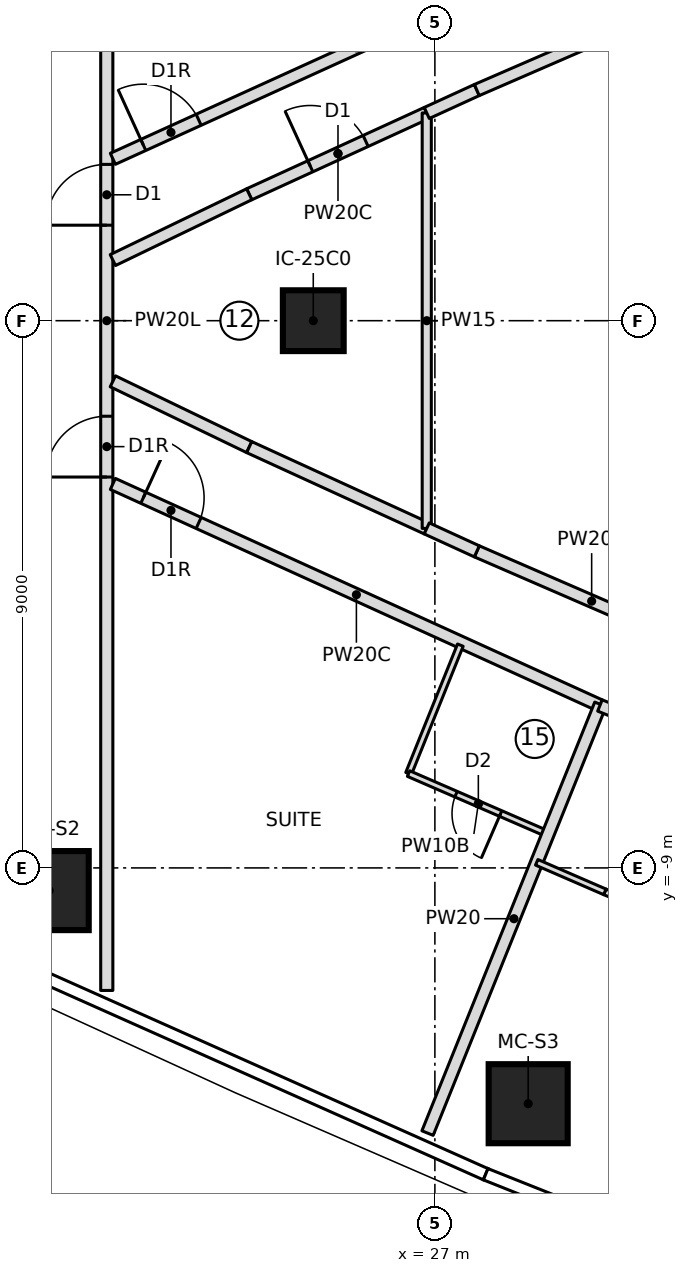
"""IFC4 building model, lengths in metres.
Left out: names, types, materials, properties, quantities, classifications, styles, units other than length and angle.
Written with IfcOpenShell. Run it as: python <this file> out.ifc"""

import sys

from ifc_helpers import new_model, si_unit, direction, frame, frame_2d, origin, origin_2d, place, context, subcontext, project, spatial, rectangle, extrude, element, fill, save


model = new_model("IFC4")
c1 = context("Model", 3, precision=1e-05, world=origin(), true_north=direction((0.0, 1.0)))
c2 = subcontext(c1, "Body", "Model", "MODEL_VIEW")
j1 = project(units=[si_unit("LENGTHUNIT", "METRE"), si_unit("PLANEANGLEUNIT", "RADIAN")], contexts=[c1])
p1 = place(None, origin())
s1 = spatial("IfcSite", under=j1, at=p1, CompositionType="ELEMENT")
p2 = place(p1, origin())
s2 = spatial("IfcBuilding", under=s1, at=p2, CompositionType="ELEMENT")
p3 = place(p2, frame((0.0, 0.0, 193.25)))
s3 = spatial("IfcBuildingStorey", under=s2, at=p3, CompositionType="ELEMENT", Elevation=193.25)
for number, where, z_axis, x_axis in (
    (1, (20.657, -9.373, 0.0), (0.0, 0.0, 1.0), (1.0, 0.0, 0.0)),
    (2, (28.534, -12.878, 0.0), (0.0, 0.0, 1.0), (1.0, 0.0, 0.0)),
):
    element("IfcColumn", number, at=place(p3, frame(where, z_axis=z_axis, x_axis=x_axis)), inside=s3, PredefinedType="COLUMN", context=c2, shape_type="SweptSolid", body=[
        extrude(rectangle(XDim=1.3, YDim=1.3, at=origin_2d()), origin(), (0.0, 0.0, 1.0), 3.55),
    ])
p4 = place(p3, frame((25.0, 0.0, 0.0), z_axis=(0.0, 0.0, 1.0), x_axis=(1.0, 0.0, 0.0)))
e3 = element("IfcColumn", 3, at=p4, inside=s3, PredefinedType="COLUMN", context=c2, shape_type="SweptSolid", body=[
    extrude(rectangle(XDim=1.0, YDim=1.0, at=origin_2d()), origin(), (0.0, 0.0, 1.0), 3.55),
])
p5 = place(p3, frame((21.604, -11.015, 0.0), z_axis=(0.0, 0.0, 1.0), x_axis=(0.0, 1.0, 0.0)))
e4 = element("IfcWall", 4, at=p5, inside=s3, PredefinedType="PARTITIONING", context=c2, shape_type="SweptSolid", body=[
    extrude(rectangle(XDim=22.031, YDim=0.2, at=frame_2d((11.015, 0.0))), origin(), (0.0, 0.0, 1.0), 3.25),
])
p6 = place(p5, frame((12.586, 0.0, 0.0)))
e5 = element("IfcOpeningElement", 5, at=p6, cuts=e4, PredefinedType="OPENING", context=c2, shape_type="SweptSolid", body=[
    extrude(rectangle(XDim=1.0, YDim=2.1, at=frame_2d((0.5, 1.05))), frame((0.0, 0.11, 0.0), z_axis=(0.0, -1.0, 0.0), x_axis=(1.0, 0.0, 0.0)), (0.0, 0.0, 1.0), 0.22),
])
p7 = place(p5, frame((8.444, 0.0, 0.0)))
e6 = element("IfcOpeningElement", 6, at=p7, cuts=e4, PredefinedType="OPENING", context=c2, shape_type="SweptSolid", body=[
    extrude(rectangle(XDim=1.0, YDim=2.1, at=frame_2d((0.5, 1.05))), frame((0.0, 0.11, 0.0), z_axis=(0.0, -1.0, 0.0), x_axis=(1.0, 0.0, 0.0)), (0.0, 0.0, 1.0), 0.22),
])
p8 = place(p3, frame((21.704, 2.663, 0.0), z_axis=(0.0, 0.0, 1.0), x_axis=(0.910233539732, 0.414095282692, 0.0)))
e7 = element("IfcWall", 7, at=p8, inside=s3, PredefinedType="PARTITIONING", context=c2, shape_type="SweptSolid", body=[
    extrude(rectangle(XDim=8.808, YDim=0.2, at=frame_2d((4.404, 0.0))), origin(), (0.0, 0.0, 1.0), 3.25),
])
p9 = place(p8, frame((0.55, 0.0, 0.0)))
e8 = element("IfcOpeningElement", 8, at=p9, cuts=e7, PredefinedType="OPENING", context=c2, shape_type="SweptSolid", body=[
    extrude(rectangle(XDim=1.0, YDim=2.1, at=frame_2d((0.5, 1.05))), frame((0.0, 0.11, 0.0), z_axis=(0.0, -1.0, 0.0), x_axis=(1.0, 0.0, 0.0)), (0.0, 0.0, 1.0), 0.22),
])
p10 = place(p3, frame((21.704, -2.685, 0.0), z_axis=(0.0, 0.0, 1.0), x_axis=(0.910242920453, -0.414074662067, 0.0)))
e9 = element("IfcWall", 9, at=p10, inside=s3, PredefinedType="PARTITIONING", context=c2, shape_type="SweptSolid", body=[
    extrude(rectangle(XDim=8.8, YDim=0.2, at=frame_2d((4.4, 0.0))), origin(), (0.0, 0.0, 1.0), 3.25),
])
p11 = place(p10, frame((0.55, 0.0, 0.0)))
e10 = element("IfcOpeningElement", 10, at=p11, cuts=e9, PredefinedType="OPENING", context=c2, shape_type="SweptSolid", body=[
    extrude(rectangle(XDim=1.0, YDim=2.1, at=frame_2d((0.5, 1.05))), frame((0.0, 0.11, 0.0), z_axis=(0.0, -1.0, 0.0), x_axis=(1.0, 0.0, 0.0)), (0.0, 0.0, 1.0), 0.22),
])
p12 = place(p3, frame((26.567, -7.449, 0.0), z_axis=(0.0, 0.0, 1.0), x_axis=(0.373957926662, 0.927445669075, 0.0)))
e11 = element("IfcWall", 11, at=p12, inside=s3, PredefinedType="PARTITIONING", context=c2, shape_type="SweptSolid", body=[
    extrude(rectangle(XDim=2.278, YDim=0.1, at=frame_2d((1.139, 0.0))), origin(), (0.0, 0.0, 1.0), 3.25),
])
p13 = place(p3, frame((28.861, -8.444, 0.0), z_axis=(0.0, 0.0, 1.0), x_axis=(-0.917363173809, 0.398051262199, 0.0)))
e12 = element("IfcWall", 12, at=p13, inside=s3, PredefinedType="PARTITIONING", context=c2, shape_type="SweptSolid", body=[
    extrude(rectangle(XDim=2.5, YDim=0.1, at=frame_2d((1.25, 0.0))), origin(), (0.0, 0.0, 1.0), 3.25),
])
p14 = place(p13, frame((0.85, 0.0, 0.0)))
e13 = element("IfcOpeningElement", 13, at=p14, cuts=e12, PredefinedType="OPENING", context=c2, shape_type="SweptSolid", body=[
    extrude(rectangle(XDim=0.8, YDim=2.1, at=frame_2d((0.4, 1.05))), frame((0.0, 0.06, 0.0), z_axis=(0.0, -1.0, 0.0), x_axis=(1.0, 0.0, 0.0)), (0.0, 0.0, 1.0), 0.12),
])
p15 = place(p3, frame((26.879, -13.361, 0.0), z_axis=(0.0, 0.0, 1.0), x_axis=(0.37388636046, 0.927474522271, 0.0)))
e14 = element("IfcWall", 14, at=p15, inside=s3, PredefinedType="PARTITIONING", context=c2, shape_type="SweptSolid", body=[
    extrude(rectangle(XDim=7.603, YDim=0.2, at=frame_2d((3.801, 0.0))), origin(), (0.0, 0.0, 1.0), 3.25),
])
p16 = place(p3, frame((29.714, -6.329, 0.0), z_axis=(0.0, 0.0, 1.0), x_axis=(0.927886226391, -0.372863448026, 0.0)))
e15 = element("IfcWall", 15, at=p16, inside=s3, PredefinedType="PARTITIONING", context=c2, shape_type="SweptSolid", body=[
    extrude(rectangle(XDim=8.8, YDim=0.2, at=frame_2d((4.4, 0.0))), origin(), (0.0, 0.0, 1.0), 3.25),
])
p17 = place(p16, frame((3.25, 0.0, 0.0)))
e16 = element("IfcOpeningElement", 16, at=p17, cuts=e15, PredefinedType="OPENING", context=c2, shape_type="SweptSolid", body=[
    extrude(rectangle(XDim=1.0, YDim=2.1, at=frame_2d((0.5, 1.05))), frame((0.0, 0.11, 0.0), z_axis=(0.0, -1.0, 0.0), x_axis=(1.0, 0.0, 0.0)), (0.0, 0.0, 1.0), 0.22),
])
p18 = place(p3, frame((31.626, -10.145, 0.0), z_axis=(0.0, 0.0, 1.0), x_axis=(-0.925208599746, 0.379458887043, 0.0)))
e17 = element("IfcWall", 17, at=p18, inside=s3, PredefinedType="PARTITIONING", context=c2, shape_type="SweptSolid", body=[
    extrude(rectangle(XDim=1.979, YDim=0.1, at=frame_2d((0.99, 0.0))), origin(), (0.0, 0.0, 1.0), 3.25),
])
p19 = place(p3, frame((29.795, -9.394, 0.0), z_axis=(0.0, 0.0, 1.0), x_axis=(-0.917378066425, 0.398016938386, 0.0)))
e18 = element("IfcWall", 18, at=p19, inside=s3, PredefinedType="PARTITIONING", context=c2, shape_type="SweptSolid", body=[
    extrude(rectangle(XDim=1.221, YDim=0.1, at=frame_2d((0.611, 0.0))), origin(), (0.0, 0.0, 1.0), 3.25),
])
p20 = place(p3, frame((23.947, 2.079, 0.0), z_axis=(0.0, 0.0, 1.0), x_axis=(0.90918596673, 0.416390295157, 0.0)))
e19 = element("IfcWall", 19, at=p20, inside=s3, PredefinedType="PARTITIONING", context=c2, shape_type="SweptSolid", body=[
    extrude(rectangle(XDim=3.211, YDim=0.2, at=frame_2d((1.606, 0.0))), origin(), (0.0, 0.0, 1.0), 3.25),
])
p21 = place(p20, frame((1.106, 0.0, 0.0)))
e20 = element("IfcOpeningElement", 20, at=p21, cuts=e19, PredefinedType="OPENING", context=c2, shape_type="SweptSolid", body=[
    extrude(rectangle(XDim=1.0, YDim=2.1, at=frame_2d((0.5, 1.05))), frame((0.0, 0.11, 0.0), z_axis=(0.0, -1.0, 0.0), x_axis=(1.0, 0.0, 0.0)), (0.0, 0.0, 1.0), 0.22),
])
for number, where, z_axis, x_axis in (
    (21, (23.947, -2.079, 0.0), (0.0, 0.0, 1.0), (-0.901, 0.435, 0.0)),
    (22, (21.704, 0.997, 0.0), (0.0, 0.0, 1.0), (0.901, 0.435, 0.0)),
):
    element("IfcWall", number, at=place(p3, frame(where, z_axis=z_axis, x_axis=x_axis)), inside=s3, PredefinedType="PARTITIONING", context=c2, shape_type="SweptSolid", body=[
        extrude(rectangle(XDim=2.49, YDim=0.2, at=frame_2d((1.245, 0.0))), origin(), (0.0, 0.0, 1.0), 3.25),
    ])
p22 = place(p3, frame((26.866, -3.416, 0.0), z_axis=(0.0, 0.0, 1.0), x_axis=(-0.90918596673, 0.416390295157, 0.0)))
e23 = element("IfcWall", 23, at=p22, inside=s3, PredefinedType="PARTITIONING", context=c2, shape_type="SweptSolid", body=[
    extrude(rectangle(XDim=3.211, YDim=0.2, at=frame_2d((1.606, 0.0))), origin(), (0.0, 0.0, 1.0), 3.25),
])
p23 = place(p3, frame((26.866, -3.416, 0.0), z_axis=(0.0, 0.0, 1.0), x_axis=(0.0, 1.0, 0.0)))
e24 = element("IfcWall", 24, at=p23, inside=s3, PredefinedType="PARTITIONING", context=c2, shape_type="SweptSolid", body=[
    extrude(rectangle(XDim=6.833, YDim=0.15, at=frame_2d((3.416, 0.0))), origin(), (0.0, 0.0, 1.0), 3.25),
])
p24 = place(p3, frame((31.467, -5.432, 0.0), z_axis=(0.0, 0.0, 1.0), x_axis=(-0.917375244839, 0.398023441717, 0.0)))
e25 = element("IfcWall", 25, at=p24, inside=s3, PredefinedType="PARTITIONING", context=c2, shape_type="SweptSolid", body=[
    extrude(rectangle(XDim=4.117, YDim=0.2, at=frame_2d((2.059, 0.0))), origin(), (0.0, 0.0, 1.0), 3.25),
])
for number, where, z_axis, x_axis in (
    (26, (27.69, -3.793, 0.0), (0.0, 0.0, 1.0), (-0.909, 0.416, 0.0)),
    (27, (26.866, 3.416, 0.0), (0.0, 0.0, 1.0), (0.909, 0.416, 0.0)),
):
    element("IfcWall", number, at=place(p3, frame(where, z_axis=z_axis, x_axis=x_axis)), inside=s3, PredefinedType="PARTITIONING", context=c2, shape_type="SweptSolid", body=[
        extrude(rectangle(XDim=0.906, YDim=0.2, at=frame_2d((0.453, 0.0))), origin(), (0.0, 0.0, 1.0), 3.25),
    ])
p25 = place(p3, frame((27.69, 3.793, 0.0), z_axis=(0.0, 0.0, 1.0), x_axis=(0.917375244839, 0.398023441717, 0.0)))
e28 = element("IfcWall", 28, at=p25, inside=s3, PredefinedType="PARTITIONING", context=c2, shape_type="SweptSolid", body=[
    extrude(rectangle(XDim=4.117, YDim=0.2, at=frame_2d((2.059, 0.0))), origin(), (0.0, 0.0, 1.0), 3.25),
])
p26 = place(p6, origin())
e29 = element("IfcDoor", 29, at=p26, inside=s3, OperationType="SINGLE_SWING_LEFT", PredefinedType="DOOR", context=c2, shape_type="SweptSolid", body=[
    extrude(rectangle(XDim=1.0, YDim=2.1, at=frame_2d((0.5, 1.05))), frame((0.0, 0.025, 0.0), z_axis=(0.0, -1.0, 0.0), x_axis=(1.0, 0.0, 0.0)), (0.0, 0.0, 1.0), 0.05),
])
fill(e5, e29)
p27 = place(p7, origin())
e30 = element("IfcDoor", 30, at=p27, inside=s3, OperationType="SINGLE_SWING_RIGHT", PredefinedType="DOOR", context=c2, shape_type="SweptSolid", body=[
    extrude(rectangle(XDim=1.0, YDim=2.1, at=frame_2d((0.5, 1.05))), frame((0.0, 0.025, 0.0), z_axis=(0.0, -1.0, 0.0), x_axis=(1.0, 0.0, 0.0)), (0.0, 0.0, 1.0), 0.05),
])
fill(e6, e30)
p28 = place(p9, origin())
e31 = element("IfcDoor", 31, at=p28, inside=s3, OperationType="SINGLE_SWING_RIGHT", PredefinedType="DOOR", context=c2, shape_type="SweptSolid", body=[
    extrude(rectangle(XDim=1.0, YDim=2.1, at=frame_2d((0.5, 1.05))), frame((0.0, 0.025, 0.0), z_axis=(0.0, -1.0, 0.0), x_axis=(1.0, 0.0, 0.0)), (0.0, 0.0, 1.0), 0.05),
])
fill(e8, e31)
p29 = place(p14, origin())
e32 = element("IfcDoor", 32, at=p29, inside=s3, OperationType="SINGLE_SWING_LEFT", PredefinedType="DOOR", context=c2, shape_type="SweptSolid", body=[
    extrude(rectangle(XDim=0.8, YDim=2.1, at=frame_2d((0.4, 1.05))), frame((0.0, 0.025, 0.0), z_axis=(0.0, -1.0, 0.0), x_axis=(1.0, 0.0, 0.0)), (0.0, 0.0, 1.0), 0.05),
])
fill(e13, e32)
p30 = place(p11, origin())
e33 = element("IfcDoor", 33, at=p30, inside=s3, OperationType="SINGLE_SWING_RIGHT", PredefinedType="DOOR", context=c2, shape_type="SweptSolid", body=[
    extrude(rectangle(XDim=1.0, YDim=2.1, at=frame_2d((0.5, 1.05))), frame((0.0, 0.025, 0.0), z_axis=(0.0, -1.0, 0.0), x_axis=(1.0, 0.0, 0.0)), (0.0, 0.0, 1.0), 0.05),
])
fill(e10, e33)
p31 = place(p21, origin())
e34 = element("IfcDoor", 34, at=p31, inside=s3, OperationType="SINGLE_SWING_LEFT", PredefinedType="DOOR", context=c2, shape_type="SweptSolid", body=[
    extrude(rectangle(XDim=1.0, YDim=2.1, at=frame_2d((0.5, 1.05))), frame((0.0, 0.025, 0.0), z_axis=(0.0, -1.0, 0.0), x_axis=(1.0, 0.0, 0.0)), (0.0, 0.0, 1.0), 0.05),
])
fill(e20, e34)
save(model, sys.argv[1])
